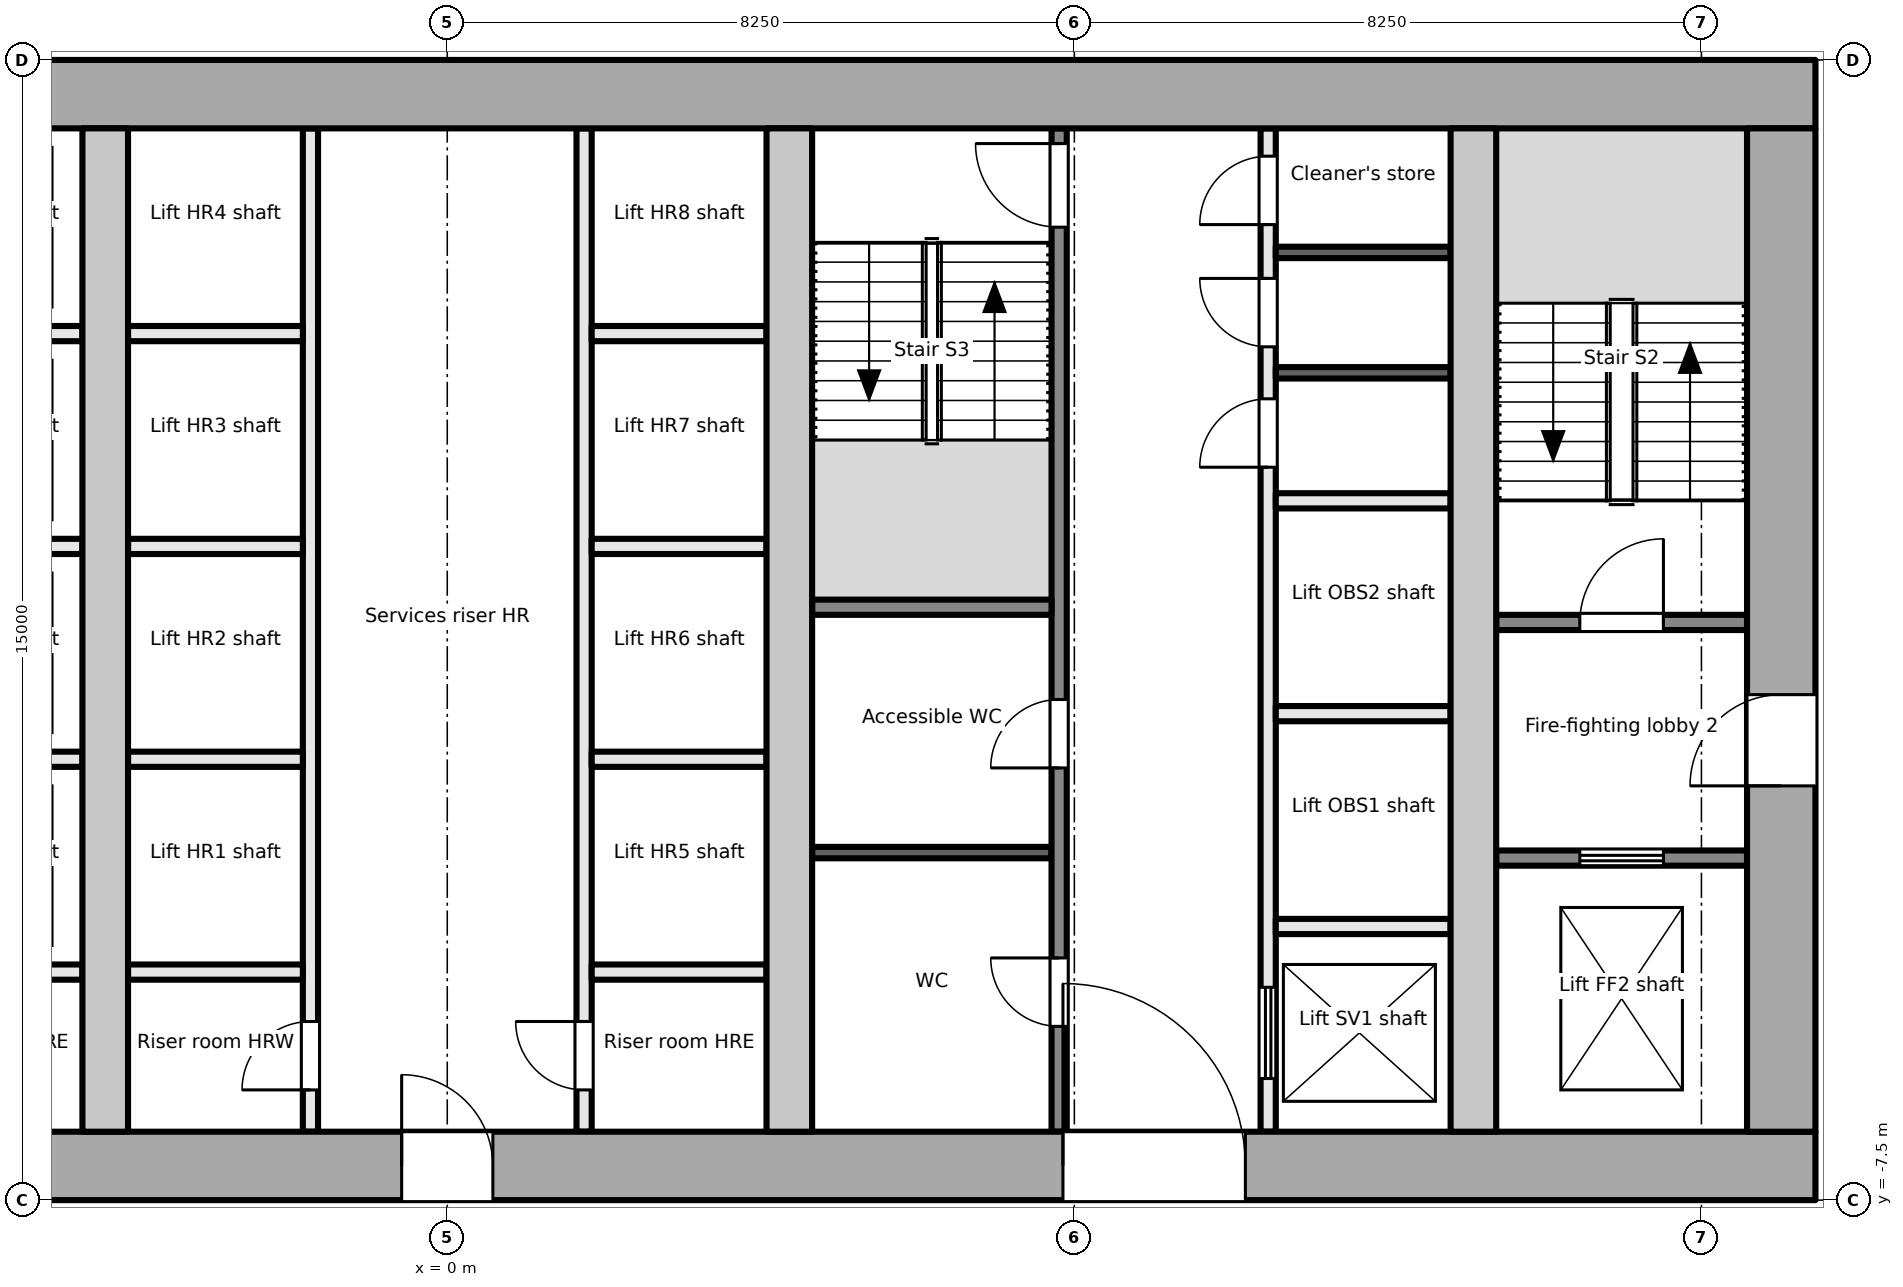
"""IFC4 building model, lengths in metres.
Left out: names, types, materials, properties, quantities, classifications, styles, units other than length and angle.
Written with IfcOpenShell. Run it as: python <this file> out.ifc"""

import sys

from ifc_helpers import new_model, si_unit, direction, frame, frame_2d, origin, place, context, subcontext, project, spatial, rectangle, extrude, element, fill, save


model = new_model("IFC4")
c1 = context("Model", 3, precision=1e-05, world=origin(), true_north=direction((0.0, 1.0)))
c2 = subcontext(c1, "Body", "Model", "MODEL_VIEW")
j1 = project(units=[si_unit("LENGTHUNIT", "METRE"), si_unit("PLANEANGLEUNIT", "RADIAN")], contexts=[c1])
p1 = place(None, origin())
s1 = spatial("IfcSite", under=j1, at=p1, CompositionType="ELEMENT")
p2 = place(p1, origin())
s2 = spatial("IfcBuilding", under=s1, at=p2, CompositionType="ELEMENT")
p3 = place(p2, frame((0.0, 0.0, 36.5)))
s3 = spatial("IfcBuildingStorey", under=s2, at=p3, CompositionType="ELEMENT", Elevation=36.5)
p4 = place(p3, frame((-18.0, -7.05, -0.2), z_axis=(0.0, 0.0, 1.0), x_axis=(1.0, 0.0, 0.0)))
e1 = element("IfcWall", 1, at=p4, inside=s3, PredefinedType="SHEAR", context=c2, shape_type="SweptSolid", body=[
    extrude(rectangle(XDim=36.0, YDim=0.9, at=frame_2d((18.0, 0.0))), origin(), (0.0, 0.0, 1.0), 4.1),
])
p5 = place(p4, frame((7.8, 0.0, 0.2)))
e2 = element("IfcOpeningElement", 2, at=p5, cuts=e1, PredefinedType="OPENING", context=c2, shape_type="SweptSolid", body=[
    extrude(rectangle(XDim=2.4, YDim=2.1, at=frame_2d((1.2, 1.05))), frame((0.0, 0.46, 0.0), z_axis=(0.0, -1.0, 0.0), x_axis=(1.0, 0.0, 0.0)), (0.0, 0.0, 1.0), 0.921),
])
p6 = place(p4, frame((17.4, 0.0, 0.2)))
e3 = element("IfcOpeningElement", 3, at=p6, cuts=e1, PredefinedType="OPENING", context=c2, shape_type="SweptSolid", body=[
    extrude(rectangle(XDim=1.2, YDim=2.1, at=frame_2d((0.6, 1.05))), frame((0.0, 0.46, 0.0), z_axis=(0.0, -1.0, 0.0), x_axis=(1.0, 0.0, 0.0)), (0.0, 0.0, 1.0), 0.921),
])
p7 = place(p4, frame((26.1, 0.0, 0.2)))
e4 = element("IfcOpeningElement", 4, at=p7, cuts=e1, PredefinedType="OPENING", context=c2, shape_type="SweptSolid", body=[
    extrude(rectangle(XDim=2.4, YDim=2.1, at=frame_2d((1.2, 1.05))), frame((0.0, 0.46, 0.0), z_axis=(0.0, -1.0, 0.0), x_axis=(1.0, 0.0, 0.0)), (0.0, 0.0, 1.0), 0.921),
])
p8 = place(p3, frame((-18.0, 7.05, -0.2), z_axis=(0.0, 0.0, 1.0), x_axis=(1.0, 0.0, 0.0)))
e5 = element("IfcWall", 5, at=p8, inside=s3, PredefinedType="SHEAR", context=c2, shape_type="SweptSolid", body=[
    extrude(rectangle(XDim=36.0, YDim=0.9, at=frame_2d((18.0, 0.0))), origin(), (0.0, 0.0, 1.0), 4.1),
])
p9 = place(p3, frame((17.55, -6.6, -0.2), z_axis=(0.0, 0.0, 1.0), x_axis=(0.0, 1.0, 0.0)))
e6 = element("IfcWall", 6, at=p9, inside=s3, PredefinedType="SHEAR", context=c2, shape_type="SweptSolid", body=[
    extrude(rectangle(XDim=13.2, YDim=0.9, at=frame_2d((6.6, 0.0))), origin(), (0.0, 0.0, 1.0), 4.1),
])
p10 = place(p9, frame((4.55, 0.0, 0.2)))
e7 = element("IfcOpeningElement", 7, at=p10, cuts=e6, PredefinedType="OPENING", context=c2, shape_type="SweptSolid", body=[
    extrude(rectangle(XDim=1.2, YDim=2.1, at=frame_2d((0.6, 1.05))), frame((0.0, 0.46, 0.0), z_axis=(0.0, -1.0, 0.0), x_axis=(1.0, 0.0, 0.0)), (0.0, 0.0, 1.0), 0.921),
])
for number, where, z_axis, x_axis in (
    (8, (-4.5, -6.6, -0.2), (0.0, 0.0, 1.0), (0.0, 1.0, 0.0)),
    (9, (4.5, -6.6, -0.2), (0.0, 0.0, 1.0), (0.0, 1.0, 0.0)),
    (10, (13.5, -6.6, -0.2), (0.0, 0.0, 1.0), (0.0, 1.0, 0.0)),
):
    element("IfcWall", number, at=place(p3, frame(where, z_axis=z_axis, x_axis=x_axis)), inside=s3, PredefinedType="SHEAR", context=c2, shape_type="SweptSolid", body=[
        extrude(rectangle(XDim=13.2, YDim=0.6, at=frame_2d((6.6, 0.0))), origin(), (0.0, 0.0, 1.0), 4.1),
    ])
p11 = place(p3, frame((13.8, -3.0, 0.0), z_axis=(0.0, 0.0, 1.0), x_axis=(1.0, 0.0, 0.0)))
e11 = element("IfcWall", 11, at=p11, inside=s3, PredefinedType="PARTITIONING", context=c2, shape_type="SweptSolid", body=[
    extrude(rectangle(XDim=3.3, YDim=0.2, at=frame_2d((1.65, 0.0))), origin(), (0.0, 0.0, 1.0), 3.9),
])
p12 = place(p11, frame((1.1, 0.0, 0.0)))
e12 = element("IfcOpeningElement", 12, at=p12, cuts=e11, PredefinedType="OPENING", context=c2, shape_type="SweptSolid", body=[
    extrude(rectangle(XDim=1.1, YDim=2.1, at=frame_2d((0.55, 1.05))), frame((0.0, 0.111, 0.0), z_axis=(0.0, -1.0, 0.0), x_axis=(1.0, 0.0, 0.0)), (0.0, 0.0, 1.0), 0.221),
])
p13 = place(p3, frame((13.8, 0.1, 0.0), z_axis=(0.0, 0.0, 1.0), x_axis=(1.0, 0.0, 0.0)))
e13 = element("IfcWall", 13, at=p13, inside=s3, PredefinedType="PARTITIONING", context=c2, shape_type="SweptSolid", body=[
    extrude(rectangle(XDim=3.3, YDim=0.2, at=frame_2d((1.65, 0.0))), origin(), (0.0, 0.0, 1.0), 3.9),
])
p14 = place(p13, frame((1.1, 0.0, 0.0)))
e14 = element("IfcOpeningElement", 14, at=p14, cuts=e13, PredefinedType="OPENING", context=c2, shape_type="SweptSolid", body=[
    extrude(rectangle(XDim=1.1, YDim=2.1, at=frame_2d((0.55, 1.05))), frame((0.0, 0.111, 0.0), z_axis=(0.0, -1.0, 0.0), x_axis=(1.0, 0.0, 0.0)), (0.0, 0.0, 1.0), 0.221),
])
for number, where, z_axis, x_axis in (
    (15, (-7.1, -1.7, 0.0), (0.0, 0.0, 1.0), (1.0, 0.0, 0.0)),
    (16, (-7.1, 1.1, 0.0), (0.0, 0.0, 1.0), (1.0, 0.0, 0.0)),
    (17, (-7.1, 3.9, 0.0), (0.0, 0.0, 1.0), (1.0, 0.0, 0.0)),
    (18, (-7.1, -4.5, 0.0), (0.0, 0.0, 1.0), (1.0, 0.0, 0.0)),
):
    element("IfcWall", number, at=place(p3, frame(where, z_axis=z_axis, x_axis=x_axis)), inside=s3, PredefinedType="PARTITIONING", context=c2, shape_type="SweptSolid", body=[
        extrude(rectangle(XDim=2.3, YDim=0.2, at=frame_2d((1.15, 0.0))), origin(), (0.0, 0.0, 1.0), 3.9),
    ])
p15 = place(p3, frame((-1.8, -6.6, 0.0), z_axis=(0.0, 0.0, 1.0), x_axis=(0.0, 1.0, 0.0)))
e19 = element("IfcWall", 19, at=p15, inside=s3, PredefinedType="PARTITIONING", context=c2, shape_type="SweptSolid", body=[
    extrude(rectangle(XDim=13.2, YDim=0.2, at=frame_2d((6.6, 0.0))), origin(), (0.0, 0.0, 1.0), 3.9),
])
p16 = place(p15, frame((0.55, 0.0, 0.0)))
e20 = element("IfcOpeningElement", 20, at=p16, cuts=e19, PredefinedType="OPENING", context=c2, shape_type="SweptSolid", body=[
    extrude(rectangle(XDim=0.9, YDim=2.1, at=frame_2d((0.45, 1.05))), frame((0.0, 0.111, 0.0), z_axis=(0.0, -1.0, 0.0), x_axis=(1.0, 0.0, 0.0)), (0.0, 0.0, 1.0), 0.221),
])
p17 = place(p3, frame((1.8, -6.6, 0.0), z_axis=(0.0, 0.0, 1.0), x_axis=(0.0, 1.0, 0.0)))
e21 = element("IfcWall", 21, at=p17, inside=s3, PredefinedType="PARTITIONING", context=c2, shape_type="SweptSolid", body=[
    extrude(rectangle(XDim=13.2, YDim=0.2, at=frame_2d((6.6, 0.0))), origin(), (0.0, 0.0, 1.0), 3.9),
])
p18 = place(p17, frame((0.55, 0.0, 0.0)))
e22 = element("IfcOpeningElement", 22, at=p18, cuts=e21, PredefinedType="OPENING", context=c2, shape_type="SweptSolid", body=[
    extrude(rectangle(XDim=0.9, YDim=2.1, at=frame_2d((0.45, 1.05))), frame((0.0, 0.111, 0.0), z_axis=(0.0, -1.0, 0.0), x_axis=(1.0, 0.0, 0.0)), (0.0, 0.0, 1.0), 0.221),
])
for number, where, z_axis, x_axis in (
    (23, (-4.2, -1.7, 0.0), (0.0, 0.0, 1.0), (1.0, 0.0, 0.0)),
    (24, (-4.2, 1.1, 0.0), (0.0, 0.0, 1.0), (1.0, 0.0, 0.0)),
    (25, (-4.2, 3.9, 0.0), (0.0, 0.0, 1.0), (1.0, 0.0, 0.0)),
    (26, (-4.2, -4.5, 0.0), (0.0, 0.0, 1.0), (1.0, 0.0, 0.0)),
    (27, (1.9, -1.7, 0.0), (0.0, 0.0, 1.0), (1.0, 0.0, 0.0)),
    (28, (1.9, 1.1, 0.0), (0.0, 0.0, 1.0), (1.0, 0.0, 0.0)),
    (29, (1.9, 3.9, 0.0), (0.0, 0.0, 1.0), (1.0, 0.0, 0.0)),
    (30, (1.9, -4.5, 0.0), (0.0, 0.0, 1.0), (1.0, 0.0, 0.0)),
):
    element("IfcWall", number, at=place(p3, frame(where, z_axis=z_axis, x_axis=x_axis)), inside=s3, PredefinedType="PARTITIONING", context=c2, shape_type="SweptSolid", body=[
        extrude(rectangle(XDim=2.3, YDim=0.2, at=frame_2d((1.15, 0.0))), origin(), (0.0, 0.0, 1.0), 3.9),
    ])
p19 = place(p3, frame((8.05, -6.6, 0.0), z_axis=(0.0, 0.0, 1.0), x_axis=(0.0, 1.0, 0.0)))
e31 = element("IfcWall", 31, at=p19, inside=s3, PredefinedType="PARTITIONING", context=c2, shape_type="SweptSolid", body=[
    extrude(rectangle(XDim=13.2, YDim=0.2, at=frame_2d((6.6, 0.0))), origin(), (0.0, 0.0, 1.0), 3.9),
])
p20 = place(p19, frame((1.386, 0.0, 0.0)))
e32 = element("IfcOpeningElement", 32, at=p20, cuts=e31, PredefinedType="OPENING", context=c2, shape_type="SweptSolid", body=[
    extrude(rectangle(XDim=0.9, YDim=2.1, at=frame_2d((0.45, 1.05))), frame((0.0, 0.111, 0.0), z_axis=(0.0, -1.0, 0.0), x_axis=(1.0, 0.0, 0.0)), (0.0, 0.0, 1.0), 0.221),
])
p21 = place(p19, frame((4.786, 0.0, 0.0)))
e33 = element("IfcOpeningElement", 33, at=p21, cuts=e31, PredefinedType="OPENING", context=c2, shape_type="SweptSolid", body=[
    extrude(rectangle(XDim=0.9, YDim=2.1, at=frame_2d((0.45, 1.05))), frame((0.0, 0.111, 0.0), z_axis=(0.0, -1.0, 0.0), x_axis=(1.0, 0.0, 0.0)), (0.0, 0.0, 1.0), 0.221),
])
p22 = place(p19, frame((11.9, 0.0, 0.0)))
e34 = element("IfcOpeningElement", 34, at=p22, cuts=e31, PredefinedType="OPENING", context=c2, shape_type="SweptSolid", body=[
    extrude(rectangle(XDim=1.1, YDim=2.1, at=frame_2d((0.55, 1.05))), frame((0.0, 0.111, 0.0), z_axis=(0.0, -1.0, 0.0), x_axis=(1.0, 0.0, 0.0)), (0.0, 0.0, 1.0), 0.221),
])
p23 = place(p3, frame((10.8, -6.6, 0.0), z_axis=(0.0, 0.0, 1.0), x_axis=(0.0, 1.0, 0.0)))
e35 = element("IfcWall", 35, at=p23, inside=s3, PredefinedType="PARTITIONING", context=c2, shape_type="SweptSolid", body=[
    extrude(rectangle(XDim=13.2, YDim=0.2, at=frame_2d((6.6, 0.0))), origin(), (0.0, 0.0, 1.0), 3.9),
])
p24 = place(p23, frame((0.7, 0.0, 0.0)))
e36 = element("IfcOpeningElement", 36, at=p24, cuts=e35, PredefinedType="OPENING", context=c2, shape_type="SweptSolid", body=[
    extrude(rectangle(XDim=1.2, YDim=2.1, at=frame_2d((0.6, 1.05))), frame((0.0, 0.111, 0.0), z_axis=(0.0, -1.0, 0.0), x_axis=(1.0, 0.0, 0.0)), (0.0, 0.0, 1.0), 0.221),
])
p25 = place(p23, frame((8.742, 0.0, 0.0)))
e37 = element("IfcOpeningElement", 37, at=p25, cuts=e35, PredefinedType="OPENING", context=c2, shape_type="SweptSolid", body=[
    extrude(rectangle(XDim=0.9, YDim=2.1, at=frame_2d((0.45, 1.05))), frame((0.0, 0.111, 0.0), z_axis=(0.0, -1.0, 0.0), x_axis=(1.0, 0.0, 0.0)), (0.0, 0.0, 1.0), 0.221),
])
p26 = place(p23, frame((10.326, 0.0, 0.0)))
e38 = element("IfcOpeningElement", 38, at=p26, cuts=e35, PredefinedType="OPENING", context=c2, shape_type="SweptSolid", body=[
    extrude(rectangle(XDim=0.9, YDim=2.1, at=frame_2d((0.45, 1.05))), frame((0.0, 0.111, 0.0), z_axis=(0.0, -1.0, 0.0), x_axis=(1.0, 0.0, 0.0)), (0.0, 0.0, 1.0), 0.221),
])
p27 = place(p23, frame((11.934, 0.0, 0.0)))
e39 = element("IfcOpeningElement", 39, at=p27, cuts=e35, PredefinedType="OPENING", context=c2, shape_type="SweptSolid", body=[
    extrude(rectangle(XDim=0.9, YDim=2.1, at=frame_2d((0.45, 1.05))), frame((0.0, 0.111, 0.0), z_axis=(0.0, -1.0, 0.0), x_axis=(1.0, 0.0, 0.0)), (0.0, 0.0, 1.0), 0.221),
])
p28 = place(p3, frame((4.8, 0.3, 0.0), z_axis=(0.0, 0.0, 1.0), x_axis=(1.0, 0.0, 0.0)))
e40 = element("IfcWall", 40, at=p28, inside=s3, PredefinedType="PARTITIONING", context=c2, shape_type="SweptSolid", body=[
    extrude(rectangle(XDim=3.15, YDim=0.2, at=frame_2d((1.575, 0.0))), origin(), (0.0, 0.0, 1.0), 3.9),
])
p29 = place(p3, frame((4.8, -2.928, 0.0), z_axis=(0.0, 0.0, 1.0), x_axis=(1.0, 0.0, 0.0)))
e41 = element("IfcWall", 41, at=p29, inside=s3, PredefinedType="PARTITIONING", context=c2, shape_type="SweptSolid", body=[
    extrude(rectangle(XDim=3.15, YDim=0.15, at=frame_2d((1.575, 0.0))), origin(), (0.0, 0.0, 1.0), 3.9),
])
for number, where, z_axis, x_axis in (
    (42, (10.9, -3.9, 0.0), (0.0, 0.0, 1.0), (1.0, 0.0, 0.0)),
    (43, (10.9, -1.1, 0.0), (0.0, 0.0, 1.0), (1.0, 0.0, 0.0)),
    (44, (10.9, 1.7, 0.0), (0.0, 0.0, 1.0), (1.0, 0.0, 0.0)),
):
    element("IfcWall", number, at=place(p3, frame(where, z_axis=z_axis, x_axis=x_axis)), inside=s3, PredefinedType="PARTITIONING", context=c2, shape_type="SweptSolid", body=[
        extrude(rectangle(XDim=2.3, YDim=0.2, at=frame_2d((1.15, 0.0))), origin(), (0.0, 0.0, 1.0), 3.9),
    ])
for number, where, z_axis, x_axis in (
    (45, (10.9, 3.384, 0.0), (0.0, 0.0, 1.0), (1.0, 0.0, 0.0)),
    (46, (10.9, 4.968, 0.0), (0.0, 0.0, 1.0), (1.0, 0.0, 0.0)),
):
    element("IfcWall", number, at=place(p3, frame(where, z_axis=z_axis, x_axis=x_axis)), inside=s3, PredefinedType="PARTITIONING", context=c2, shape_type="SweptSolid", body=[
        extrude(rectangle(XDim=2.3, YDim=0.15, at=frame_2d((1.15, 0.0))), origin(), (0.0, 0.0, 1.0), 3.9),
    ])
p30 = place(p12, origin())
e47 = element("IfcDoor", 47, at=p30, inside=s3, OperationType="DOUBLE_DOOR_SLIDING", PredefinedType="DOOR", context=c2, shape_type="SweptSolid", body=[
    extrude(rectangle(XDim=1.1, YDim=2.1, at=frame_2d((0.55, 1.05))), frame((0.0, 0.025, 0.0), z_axis=(0.0, -1.0, 0.0), x_axis=(1.0, 0.0, 0.0)), (0.0, 0.0, 1.0), 0.05),
])
fill(e12, e47)
p31 = place(p10, origin())
e48 = element("IfcDoor", 48, at=p31, inside=s3, OperationType="SINGLE_SWING_LEFT", PredefinedType="DOOR", context=c2, shape_type="SweptSolid", body=[
    extrude(rectangle(XDim=1.2, YDim=2.1, at=frame_2d((0.6, 1.05))), frame((0.0, 0.025, 0.0), z_axis=(0.0, -1.0, 0.0), x_axis=(1.0, 0.0, 0.0)), (0.0, 0.0, 1.0), 0.05),
])
fill(e7, e48)
p32 = place(p14, origin())
e49 = element("IfcDoor", 49, at=p32, inside=s3, OperationType="SINGLE_SWING_RIGHT", PredefinedType="DOOR", context=c2, shape_type="SweptSolid", body=[
    extrude(rectangle(XDim=1.1, YDim=2.1, at=frame_2d((0.55, 1.05))), frame((0.0, 0.025, 0.0), z_axis=(0.0, -1.0, 0.0), x_axis=(1.0, 0.0, 0.0)), (0.0, 0.0, 1.0), 0.05),
])
fill(e14, e49)
p33 = place(p16, origin())
e50 = element("IfcDoor", 50, at=p33, inside=s3, OperationType="SINGLE_SWING_LEFT", PredefinedType="DOOR", context=c2, shape_type="SweptSolid", body=[
    extrude(rectangle(XDim=0.9, YDim=2.1, at=frame_2d((0.45, 1.05))), frame((0.0, 0.025, 0.0), z_axis=(0.0, -1.0, 0.0), x_axis=(1.0, 0.0, 0.0)), (0.0, 0.0, 1.0), 0.05),
])
fill(e20, e50)
p34 = place(p18, origin())
e51 = element("IfcDoor", 51, at=p34, inside=s3, OperationType="SINGLE_SWING_RIGHT", PredefinedType="DOOR", context=c2, shape_type="SweptSolid", body=[
    extrude(rectangle(XDim=0.9, YDim=2.1, at=frame_2d((0.45, 1.05))), frame((0.0, 0.025, 0.0), z_axis=(0.0, -1.0, 0.0), x_axis=(1.0, 0.0, 0.0)), (0.0, 0.0, 1.0), 0.05),
])
fill(e22, e51)
p35 = place(p6, origin())
e52 = element("IfcDoor", 52, at=p35, inside=s3, OperationType="SINGLE_SWING_LEFT", PredefinedType="DOOR", context=c2, shape_type="SweptSolid", body=[
    extrude(rectangle(XDim=1.2, YDim=2.1, at=frame_2d((0.6, 1.05))), frame((0.0, 0.025, 0.0), z_axis=(0.0, -1.0, 0.0), x_axis=(1.0, 0.0, 0.0)), (0.0, 0.0, 1.0), 0.05),
])
fill(e3, e52)
p36 = place(p20, origin())
e53 = element("IfcDoor", 53, at=p36, inside=s3, OperationType="SINGLE_SWING_RIGHT", PredefinedType="DOOR", context=c2, shape_type="SweptSolid", body=[
    extrude(rectangle(XDim=0.9, YDim=2.1, at=frame_2d((0.45, 1.05))), frame((0.0, 0.025, 0.0), z_axis=(0.0, -1.0, 0.0), x_axis=(1.0, 0.0, 0.0)), (0.0, 0.0, 1.0), 0.05),
])
fill(e32, e53)
p37 = place(p21, origin())
e54 = element("IfcDoor", 54, at=p37, inside=s3, OperationType="SINGLE_SWING_LEFT", PredefinedType="DOOR", context=c2, shape_type="SweptSolid", body=[
    extrude(rectangle(XDim=0.9, YDim=2.1, at=frame_2d((0.45, 1.05))), frame((0.0, 0.025, 0.0), z_axis=(0.0, -1.0, 0.0), x_axis=(1.0, 0.0, 0.0)), (0.0, 0.0, 1.0), 0.05),
])
fill(e33, e54)
p38 = place(p22, origin())
e55 = element("IfcDoor", 55, at=p38, inside=s3, OperationType="SINGLE_SWING_RIGHT", PredefinedType="DOOR", context=c2, shape_type="SweptSolid", body=[
    extrude(rectangle(XDim=1.1, YDim=2.1, at=frame_2d((0.55, 1.05))), frame((0.0, 0.025, 0.0), z_axis=(0.0, -1.0, 0.0), x_axis=(1.0, 0.0, 0.0)), (0.0, 0.0, 1.0), 0.05),
])
fill(e34, e55)
p39 = place(p7, origin())
e56 = element("IfcDoor", 56, at=p39, inside=s3, OperationType="DOUBLE_DOOR_DOUBLE_SWING", PredefinedType="DOOR", context=c2, shape_type="SweptSolid", body=[
    extrude(rectangle(XDim=2.4, YDim=2.1, at=frame_2d((1.2, 1.05))), frame((0.0, 0.025, 0.0), z_axis=(0.0, -1.0, 0.0), x_axis=(1.0, 0.0, 0.0)), (0.0, 0.0, 1.0), 0.05),
])
fill(e4, e56)
p40 = place(p24, origin())
e57 = element("IfcDoor", 57, at=p40, inside=s3, OperationType="DOUBLE_DOOR_SLIDING", PredefinedType="DOOR", context=c2, shape_type="SweptSolid", body=[
    extrude(rectangle(XDim=1.2, YDim=2.1, at=frame_2d((0.6, 1.05))), frame((0.0, 0.025, 0.0), z_axis=(0.0, -1.0, 0.0), x_axis=(1.0, 0.0, 0.0)), (0.0, 0.0, 1.0), 0.05),
])
fill(e36, e57)
p41 = place(p25, origin())
e58 = element("IfcDoor", 58, at=p41, inside=s3, OperationType="SINGLE_SWING_LEFT", PredefinedType="DOOR", context=c2, shape_type="SweptSolid", body=[
    extrude(rectangle(XDim=0.9, YDim=2.1, at=frame_2d((0.45, 1.05))), frame((0.0, 0.025, 0.0), z_axis=(0.0, -1.0, 0.0), x_axis=(1.0, 0.0, 0.0)), (0.0, 0.0, 1.0), 0.05),
])
fill(e37, e58)
p42 = place(p26, origin())
e59 = element("IfcDoor", 59, at=p42, inside=s3, OperationType="SINGLE_SWING_RIGHT", PredefinedType="DOOR", context=c2, shape_type="SweptSolid", body=[
    extrude(rectangle(XDim=0.9, YDim=2.1, at=frame_2d((0.45, 1.05))), frame((0.0, 0.025, 0.0), z_axis=(0.0, -1.0, 0.0), x_axis=(1.0, 0.0, 0.0)), (0.0, 0.0, 1.0), 0.05),
])
fill(e38, e59)
p43 = place(p27, origin())
e60 = element("IfcDoor", 60, at=p43, inside=s3, OperationType="SINGLE_SWING_LEFT", PredefinedType="DOOR", context=c2, shape_type="SweptSolid", body=[
    extrude(rectangle(XDim=0.9, YDim=2.1, at=frame_2d((0.45, 1.05))), frame((0.0, 0.025, 0.0), z_axis=(0.0, -1.0, 0.0), x_axis=(1.0, 0.0, 0.0)), (0.0, 0.0, 1.0), 0.05),
])
fill(e39, e60)
save(model, sys.argv[1])
